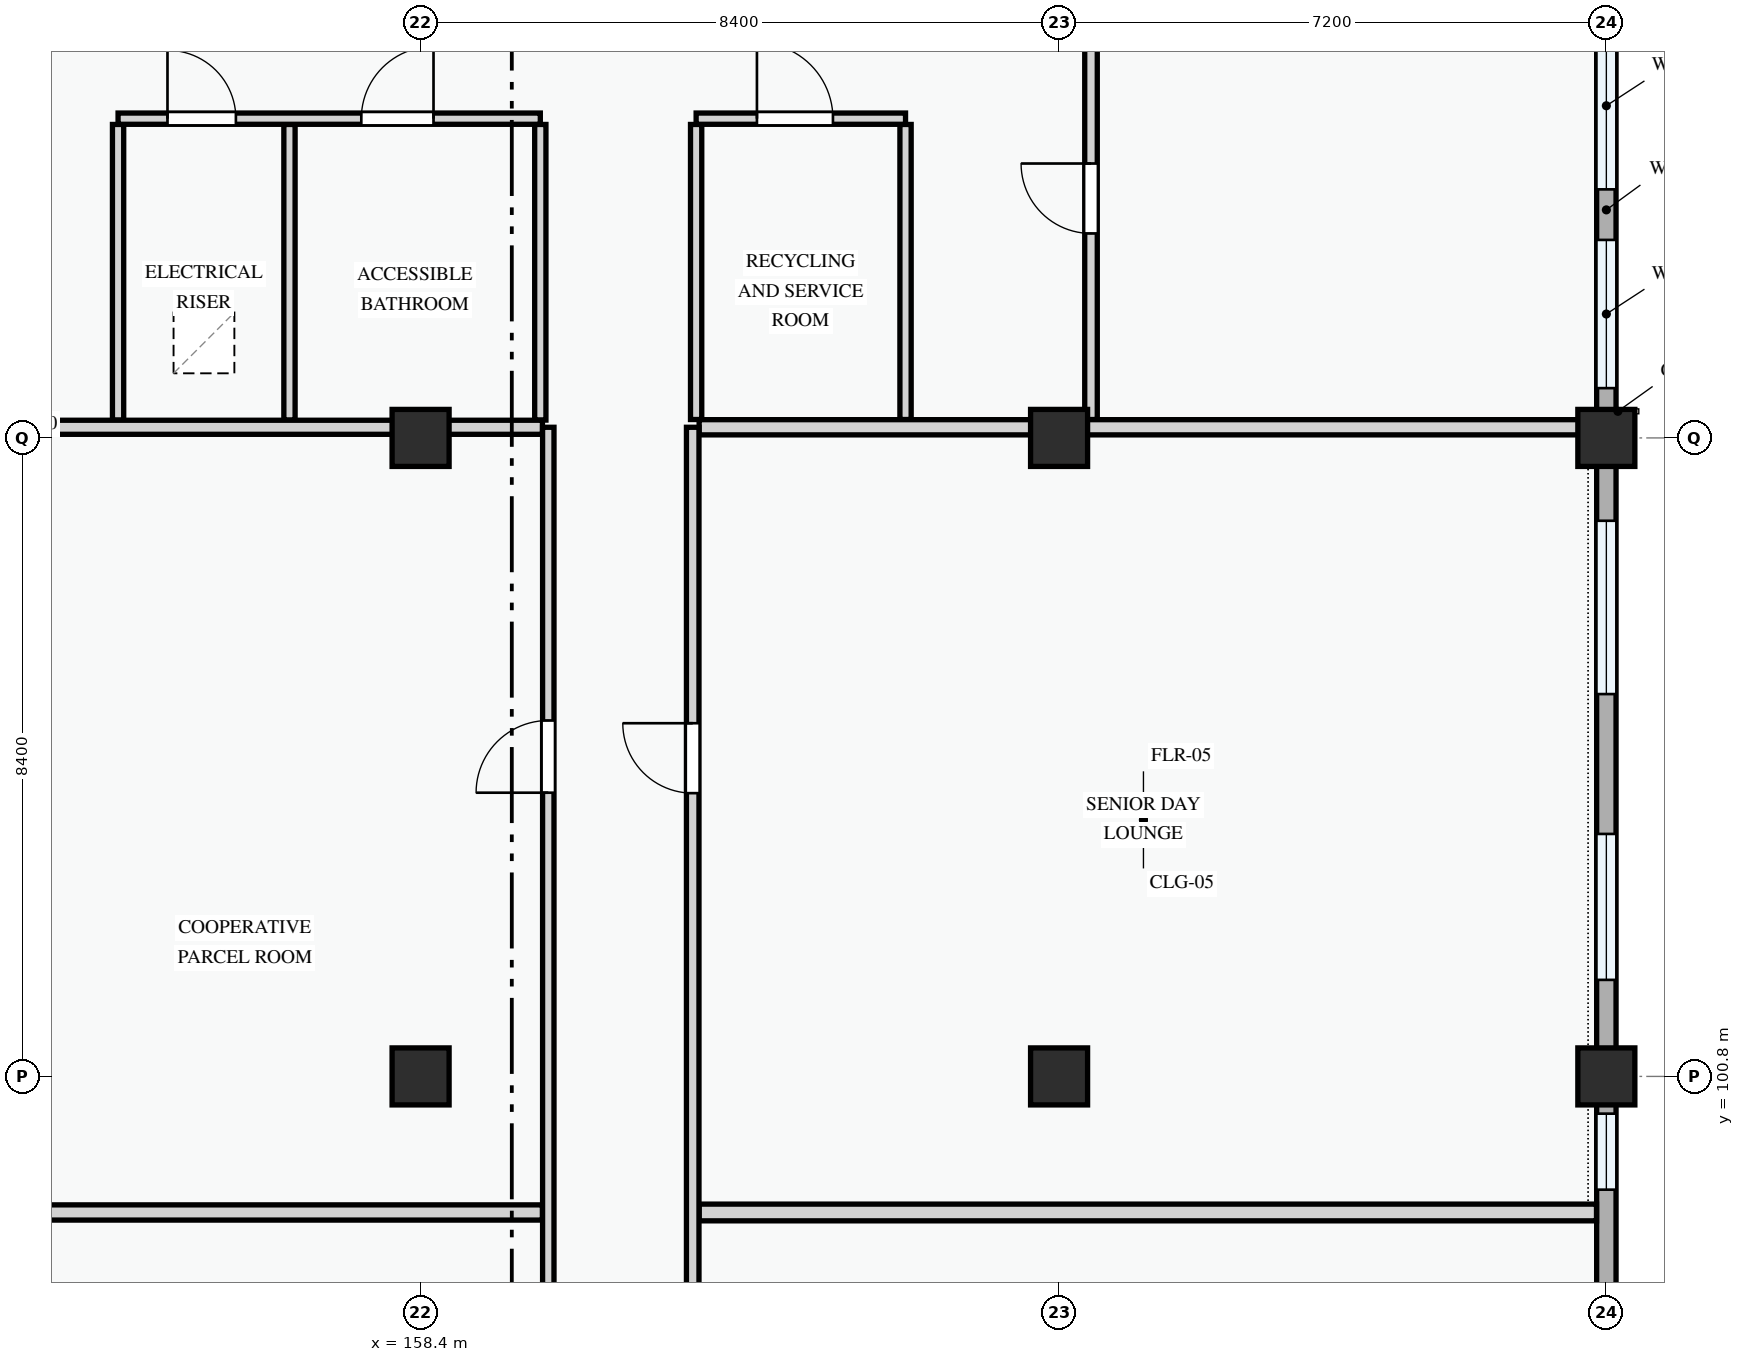
"""IFC4 building model, lengths in metres.
Left out: names, types, materials, properties, quantities, classifications, styles, units other than length and angle.
Written with IfcOpenShell. Run it as: python <this file> out.ifc"""

import sys

from ifc_helpers import new_model, si_unit, direction, frame, frame_2d, origin, origin_2d, place, context, subcontext, project, spatial, rectangle, extrude, element, fill, save


model = new_model("IFC4")
c1 = context("Model", 3, precision=1e-05, world=origin(), true_north=direction((0.0, 1.0)))
c2 = subcontext(c1, "Body", "Model", "MODEL_VIEW")
j1 = project(units=[si_unit("LENGTHUNIT", "METRE"), si_unit("PLANEANGLEUNIT", "RADIAN")], contexts=[c1])
p1 = place(None, origin())
s1 = spatial("IfcSite", under=j1, at=p1, CompositionType="ELEMENT")
p2 = place(p1, origin())
s2 = spatial("IfcBuilding", under=s1, at=p2, CompositionType="ELEMENT")
p3 = place(p2, origin())
s3 = spatial("IfcBuildingStorey", under=s2, at=p3, CompositionType="ELEMENT", Elevation=0.0)
for number, where, z_axis, x_axis in (
    (1, (158.4, 100.8, 0.0), (0.0, 0.0, 1.0), (1.0, 0.0, 0.0)),
    (2, (158.4, 109.2, 0.0), (0.0, 0.0, 1.0), (1.0, 0.0, 0.0)),
    (3, (166.8, 100.8, 0.0), (0.0, 0.0, 1.0), (1.0, 0.0, 0.0)),
    (4, (166.8, 109.2, 0.0), (0.0, 0.0, 1.0), (1.0, 0.0, 0.0)),
    (5, (174.0, 100.8, 0.0), (0.0, 0.0, 1.0), (1.0, 0.0, 0.0)),
    (6, (174.0, 109.2, 0.0), (0.0, 0.0, 1.0), (1.0, 0.0, 0.0)),
):
    element("IfcColumn", number, at=place(p3, frame(where, z_axis=z_axis, x_axis=x_axis)), inside=s3, PredefinedType="COLUMN", context=c2, shape_type="SweptSolid", body=[
        extrude(rectangle(XDim=0.75, YDim=0.75, at=origin_2d()), origin(), (0.0, 0.0, 1.0), 4.5),
    ])
p4 = place(p3, frame((174.0, 109.2, 0.0), z_axis=(0.0, 0.0, 1.0), x_axis=(0.0, 1.0, 0.0)))
e7 = element("IfcWall", 7, at=p4, inside=s3, PredefinedType="STANDARD", context=c2, shape_type="SweptSolid", body=[
    extrude(rectangle(XDim=6.0, YDim=0.255, at=frame_2d((3.0, 0.0))), origin(), (0.0, 0.0, 1.0), 3.585),
])
p5 = place(p4, frame((0.655, 0.0, 0.78)))
e8 = element("IfcOpeningElement", 8, at=p5, cuts=e7, PredefinedType="OPENING", context=c2, shape_type="SweptSolid", body=[
    extrude(rectangle(XDim=1.95, YDim=1.65, at=frame_2d((0.975, 0.825))), frame((0.0, 0.137, 0.0), z_axis=(0.0, -1.0, 0.0), x_axis=(1.0, 0.0, 0.0)), (0.0, 0.0, 1.0), 0.275),
])
p6 = place(p4, frame((3.27, 0.0, 0.78)))
e9 = element("IfcOpeningElement", 9, at=p6, cuts=e7, PredefinedType="OPENING", context=c2, shape_type="SweptSolid", body=[
    extrude(rectangle(XDim=2.2, YDim=1.5, at=frame_2d((1.1, 0.75))), frame((0.0, 0.137, 0.0), z_axis=(0.0, -1.0, 0.0), x_axis=(1.0, 0.0, 0.0)), (0.0, 0.0, 1.0), 0.275),
])
p7 = place(p3, frame((174.0, 94.8, 0.0), z_axis=(0.0, 0.0, 1.0), x_axis=(0.0, 1.0, 0.0)))
e10 = element("IfcWall", 10, at=p7, inside=s3, PredefinedType="STANDARD", context=c2, shape_type="SweptSolid", body=[
    extrude(rectangle(XDim=6.0, YDim=0.255, at=frame_2d((3.0, 0.0))), origin(), (0.0, 0.0, 1.0), 3.585),
])
p8 = place(p7, frame((1.4, 0.0, 0.0)))
e11 = element("IfcOpeningElement", 11, at=p8, cuts=e10, PredefinedType="OPENING", context=c2, shape_type="SweptSolid", body=[
    extrude(rectangle(XDim=1.6, YDim=2.35, at=frame_2d((0.8, 1.175))), frame((0.0, 0.137, 0.0), z_axis=(0.0, -1.0, 0.0), x_axis=(1.0, 0.0, 0.0)), (0.0, 0.0, 1.0), 0.275),
])
p9 = place(p7, frame((4.51, 0.0, 0.78)))
e12 = element("IfcOpeningElement", 12, at=p9, cuts=e10, PredefinedType="OPENING", context=c2, shape_type="SweptSolid", body=[
    extrude(rectangle(XDim=1.0, YDim=1.25, at=frame_2d((0.5, 0.625))), frame((0.0, 0.137, 0.0), z_axis=(0.0, -1.0, 0.0), x_axis=(1.0, 0.0, 0.0)), (0.0, 0.0, 1.0), 0.275),
])
p10 = place(p3, frame((174.0, 100.8, 0.0), z_axis=(0.0, 0.0, 1.0), x_axis=(0.0, 1.0, 0.0)))
e13 = element("IfcWall", 13, at=p10, inside=s3, PredefinedType="STANDARD", context=c2, shape_type="SweptSolid", body=[
    extrude(rectangle(XDim=8.4, YDim=0.255, at=frame_2d((4.2, 0.0))), origin(), (0.0, 0.0, 1.0), 3.485),
])
p11 = place(p10, frame((1.27, 0.0, 0.78)))
e14 = element("IfcOpeningElement", 14, at=p11, cuts=e13, PredefinedType="OPENING", context=c2, shape_type="SweptSolid", body=[
    extrude(rectangle(XDim=1.92, YDim=1.44, at=frame_2d((0.96, 0.72))), frame((0.0, 0.137, 0.0), z_axis=(0.0, -1.0, 0.0), x_axis=(1.0, 0.0, 0.0)), (0.0, 0.0, 1.0), 0.275),
])
p12 = place(p10, frame((5.03, 0.0, 0.78)))
e15 = element("IfcOpeningElement", 15, at=p12, cuts=e13, PredefinedType="OPENING", context=c2, shape_type="SweptSolid", body=[
    extrude(rectangle(XDim=2.28, YDim=1.46, at=frame_2d((1.14, 0.73))), frame((0.0, 0.137, 0.0), z_axis=(0.0, -1.0, 0.0), x_axis=(1.0, 0.0, 0.0)), (0.0, 0.0, 1.0), 0.275),
])
for number, where, z_axis, x_axis in (
    (16, (154.42, 113.324, 0.0), (0.0, 0.0, 1.0), (0.0, -1.0, 0.0)),
    (17, (156.675, 113.324, 0.0), (0.0, 0.0, 1.0), (0.0, -1.0, 0.0)),
    (18, (159.975, 113.324, 0.0), (0.0, 0.0, 1.0), (0.0, -1.0, 0.0)),
):
    element("IfcWall", number, at=place(p3, frame(where, z_axis=z_axis, x_axis=x_axis)), inside=s3, PredefinedType="PARTITIONING", context=c2, shape_type="SweptSolid", body=[
        extrude(rectangle(XDim=3.889, YDim=0.148, at=frame_2d((1.945, 0.0))), origin(), (0.0, 0.0, 1.0), 4.2),
    ])
for number, where, z_axis, x_axis in (
    (19, (162.025, 113.324, 0.0), (0.0, 0.0, 1.0), (0.0, -1.0, 0.0)),
    (20, (164.78, 113.324, 0.0), (0.0, 0.0, 1.0), (0.0, -1.0, 0.0)),
):
    element("IfcWall", number, at=place(p3, frame(where, z_axis=z_axis, x_axis=x_axis)), inside=s3, PredefinedType="PARTITIONING", context=c2, shape_type="SweptSolid", body=[
        extrude(rectangle(XDim=3.882, YDim=0.148, at=frame_2d((1.941, 0.0))), origin(), (0.0, 0.0, 1.0), 4.2),
    ])
p13 = place(p3, frame((154.42, 113.4, 0.0), z_axis=(0.0, 0.0, 1.0), x_axis=(1.0, 0.0, 0.0)))
e21 = element("IfcWall", 21, at=p13, inside=s3, PredefinedType="PARTITIONING", context=c2, shape_type="SweptSolid", body=[
    extrude(rectangle(XDim=5.555, YDim=0.148, at=frame_2d((2.778, 0.0))), origin(), (0.0, 0.0, 1.0), 4.2),
])
p14 = place(p13, frame((0.65, 0.0, 0.0)))
e22 = element("IfcOpeningElement", 22, at=p14, cuts=e21, PredefinedType="OPENING", context=c2, shape_type="SweptSolid", body=[
    extrude(rectangle(XDim=0.9, YDim=2.1, at=frame_2d((0.45, 1.05))), frame((0.0, 0.084, 0.0), z_axis=(0.0, -1.0, 0.0), x_axis=(1.0, 0.0, 0.0)), (0.0, 0.0, 1.0), 0.168),
])
p15 = place(p13, frame((3.2, 0.0, 0.0)))
e23 = element("IfcOpeningElement", 23, at=p15, cuts=e21, PredefinedType="OPENING", context=c2, shape_type="SweptSolid", body=[
    extrude(rectangle(XDim=0.95, YDim=2.1, at=frame_2d((0.475, 1.05))), frame((0.0, 0.084, 0.0), z_axis=(0.0, -1.0, 0.0), x_axis=(1.0, 0.0, 0.0)), (0.0, 0.0, 1.0), 0.168),
])
p16 = place(p3, frame((162.025, 113.4, 0.0), z_axis=(0.0, 0.0, 1.0), x_axis=(1.0, 0.0, 0.0)))
e24 = element("IfcWall", 24, at=p16, inside=s3, PredefinedType="PARTITIONING", context=c2, shape_type="SweptSolid", body=[
    extrude(rectangle(XDim=2.755, YDim=0.148, at=frame_2d((1.377, 0.0))), origin(), (0.0, 0.0, 1.0), 4.2),
])
p17 = place(p16, frame((0.8, 0.0, 0.0)))
e25 = element("IfcOpeningElement", 25, at=p17, cuts=e24, PredefinedType="OPENING", context=c2, shape_type="SweptSolid", body=[
    extrude(rectangle(XDim=1.0, YDim=2.15, at=frame_2d((0.5, 1.075))), frame((0.0, 0.084, 0.0), z_axis=(0.0, -1.0, 0.0), x_axis=(1.0, 0.0, 0.0)), (0.0, 0.0, 1.0), 0.168),
])
p18 = place(p3, frame((167.22, 109.442, 0.0), z_axis=(0.0, 0.0, 1.0), x_axis=(0.0, 1.0, 0.0)))
e26 = element("IfcWall", 26, at=p18, inside=s3, PredefinedType="PARTITIONING", context=c2, shape_type="SweptSolid", body=[
    extrude(rectangle(XDim=14.018, YDim=0.165, at=frame_2d((7.009, 0.0))), origin(), (0.0, 0.0, 1.0), 3.485),
])
p19 = place(p18, frame((2.448, 0.0, 0.0)))
e27 = element("IfcOpeningElement", 27, at=p19, cuts=e26, PredefinedType="OPENING", context=c2, shape_type="SweptSolid", body=[
    extrude(rectangle(XDim=0.92, YDim=2.1, at=frame_2d((0.46, 1.05))), frame((0.0, 0.093, 0.0), z_axis=(0.0, -1.0, 0.0), x_axis=(1.0, 0.0, 0.0)), (0.0, 0.0, 1.0), 0.185),
])
p20 = place(p3, frame((152.53, 99.01, 0.0), z_axis=(0.0, 0.0, 1.0), x_axis=(1.0, 0.0, 0.0)))
e28 = element("IfcWall", 28, at=p20, inside=s3, PredefinedType="PARTITIONING", context=c2, shape_type="SweptSolid", body=[
    extrude(rectangle(XDim=7.473, YDim=0.2, at=frame_2d((3.737, 0.0))), origin(), (0.0, 0.0, 1.0), 4.2),
])
p21 = place(p3, frame((162.064, 99.01, 0.0), z_axis=(0.0, 0.0, 1.0), x_axis=(1.0, 0.0, 0.0)))
e29 = element("IfcWall", 29, at=p21, inside=s3, PredefinedType="PARTITIONING", context=c2, shape_type="SweptSolid", body=[
    extrude(rectangle(XDim=11.806, YDim=0.22, at=frame_2d((5.903, 0.0))), origin(), (0.0, 0.0, 1.0), 4.2),
])
p22 = place(p3, frame((152.46, 109.34, 0.0), z_axis=(0.0, 0.0, 1.0), x_axis=(1.0, 0.0, 0.0)))
e30 = element("IfcWall", 30, at=p22, inside=s3, PredefinedType="PARTITIONING", context=c2, shape_type="SweptSolid", body=[
    extrude(rectangle(XDim=7.543, YDim=0.185, at=frame_2d((3.771, 0.0))), origin(), (0.0, 0.0, 1.0), 3.485),
])
p23 = place(p3, frame((162.064, 109.34, 0.0), z_axis=(0.0, 0.0, 1.0), x_axis=(1.0, 0.0, 0.0)))
e31 = element("IfcWall", 31, at=p23, inside=s3, PredefinedType="PARTITIONING", context=c2, shape_type="SweptSolid", body=[
    extrude(rectangle(XDim=11.806, YDim=0.2, at=frame_2d((5.903, 0.0))), origin(), (0.0, 0.0, 1.0), 3.485),
])
p24 = place(p3, frame((160.08, 80.53, 0.0), z_axis=(0.0, 0.0, 1.0), x_axis=(0.0, 1.0, 0.0)))
e32 = element("IfcWall", 32, at=p24, inside=s3, PredefinedType="PARTITIONING", context=c2, shape_type="SweptSolid", body=[
    extrude(rectangle(XDim=28.811, YDim=0.15, at=frame_2d((14.405, 0.0))), origin(), (0.0, 0.0, 1.0), 4.2),
])
p25 = place(p24, frame((2.453, 0.0, 0.0)))
e33 = element("IfcOpeningElement", 33, at=p25, cuts=e32, PredefinedType="OPENING", context=c2, shape_type="SweptSolid", body=[
    extrude(rectangle(XDim=0.95, YDim=2.1, at=frame_2d((0.475, 1.05))), frame((0.0, 0.085, 0.0), z_axis=(0.0, -1.0, 0.0), x_axis=(1.0, 0.0, 0.0)), (0.0, 0.0, 1.0), 0.17),
])
p26 = place(p24, frame((9.71, 0.0, 0.0)))
e34 = element("IfcOpeningElement", 34, at=p26, cuts=e32, PredefinedType="OPENING", context=c2, shape_type="SweptSolid", body=[
    extrude(rectangle(XDim=0.95, YDim=2.1, at=frame_2d((0.475, 1.05))), frame((0.0, 0.085, 0.0), z_axis=(0.0, -1.0, 0.0), x_axis=(1.0, 0.0, 0.0)), (0.0, 0.0, 1.0), 0.17),
])
p27 = place(p24, frame((24.003, 0.0, 0.0)))
e35 = element("IfcOpeningElement", 35, at=p27, cuts=e32, PredefinedType="OPENING", context=c2, shape_type="SweptSolid", body=[
    extrude(rectangle(XDim=0.95, YDim=2.1, at=frame_2d((0.475, 1.05))), frame((0.0, 0.085, 0.0), z_axis=(0.0, -1.0, 0.0), x_axis=(1.0, 0.0, 0.0)), (0.0, 0.0, 1.0), 0.17),
])
p28 = place(p3, frame((161.98, 80.53, 0.0), z_axis=(0.0, 0.0, 1.0), x_axis=(0.0, 1.0, 0.0)))
e36 = element("IfcWall", 36, at=p28, inside=s3, PredefinedType="PARTITIONING", context=c2, shape_type="SweptSolid", body=[
    extrude(rectangle(XDim=28.811, YDim=0.165, at=frame_2d((14.405, 0.0))), origin(), (0.0, 0.0, 1.0), 4.2),
])
p29 = place(p28, frame((2.45, 0.0, 0.0)))
e37 = element("IfcOpeningElement", 37, at=p29, cuts=e36, PredefinedType="OPENING", context=c2, shape_type="SweptSolid", body=[
    extrude(rectangle(XDim=0.92, YDim=2.1, at=frame_2d((0.46, 1.05))), frame((0.0, 0.093, 0.0), z_axis=(0.0, -1.0, 0.0), x_axis=(1.0, 0.0, 0.0)), (0.0, 0.0, 1.0), 0.185),
])
p30 = place(p28, frame((9.71, 0.0, 0.0)))
e38 = element("IfcOpeningElement", 38, at=p30, cuts=e36, PredefinedType="OPENING", context=c2, shape_type="SweptSolid", body=[
    extrude(rectangle(XDim=0.92, YDim=2.1, at=frame_2d((0.46, 1.05))), frame((0.0, 0.093, 0.0), z_axis=(0.0, -1.0, 0.0), x_axis=(1.0, 0.0, 0.0)), (0.0, 0.0, 1.0), 0.185),
])
p31 = place(p28, frame((23.997, 0.0, 0.0)))
e39 = element("IfcOpeningElement", 39, at=p31, cuts=e36, PredefinedType="OPENING", context=c2, shape_type="SweptSolid", body=[
    extrude(rectangle(XDim=0.92, YDim=2.1, at=frame_2d((0.46, 1.05))), frame((0.0, 0.093, 0.0), z_axis=(0.0, -1.0, 0.0), x_axis=(1.0, 0.0, 0.0)), (0.0, 0.0, 1.0), 0.185),
])
p32 = place(p5, origin())
e40 = element("IfcWindow", 40, at=p32, inside=s3, PartitioningType="DOUBLE_PANEL_VERTICAL", PredefinedType="WINDOW", context=c2, shape_type="SweptSolid", body=[
    extrude(rectangle(XDim=1.95, YDim=1.65, at=frame_2d((0.975, 0.825))), frame((0.0, 0.03, 0.0), z_axis=(0.0, -1.0, 0.0), x_axis=(1.0, 0.0, 0.0)), (0.0, 0.0, 1.0), 0.06),
])
fill(e8, e40)
p33 = place(p6, origin())
e41 = element("IfcWindow", 41, at=p33, inside=s3, PartitioningType="DOUBLE_PANEL_VERTICAL", PredefinedType="WINDOW", context=c2, shape_type="SweptSolid", body=[
    extrude(rectangle(XDim=2.2, YDim=1.5, at=frame_2d((1.1, 0.75))), frame((0.0, 0.03, 0.0), z_axis=(0.0, -1.0, 0.0), x_axis=(1.0, 0.0, 0.0)), (0.0, 0.0, 1.0), 0.06),
])
fill(e9, e41)
p34 = place(p9, origin())
e42 = element("IfcWindow", 42, at=p34, inside=s3, PartitioningType="SINGLE_PANEL", PredefinedType="WINDOW", context=c2, shape_type="SweptSolid", body=[
    extrude(rectangle(XDim=1.0, YDim=1.25, at=frame_2d((0.5, 0.625))), frame((0.0, 0.03, 0.0), z_axis=(0.0, -1.0, 0.0), x_axis=(1.0, 0.0, 0.0)), (0.0, 0.0, 1.0), 0.06),
])
fill(e12, e42)
p35 = place(p11, origin())
e43 = element("IfcWindow", 43, at=p35, inside=s3, PartitioningType="DOUBLE_PANEL_VERTICAL", PredefinedType="WINDOW", context=c2, shape_type="SweptSolid", body=[
    extrude(rectangle(XDim=1.92, YDim=1.44, at=frame_2d((0.96, 0.72))), frame((0.0, 0.03, 0.0), z_axis=(0.0, -1.0, 0.0), x_axis=(1.0, 0.0, 0.0)), (0.0, 0.0, 1.0), 0.06),
])
fill(e14, e43)
p36 = place(p12, origin())
e44 = element("IfcWindow", 44, at=p36, inside=s3, PartitioningType="DOUBLE_PANEL_VERTICAL", PredefinedType="WINDOW", context=c2, shape_type="SweptSolid", body=[
    extrude(rectangle(XDim=2.28, YDim=1.46, at=frame_2d((1.14, 0.73))), frame((0.0, 0.03, 0.0), z_axis=(0.0, -1.0, 0.0), x_axis=(1.0, 0.0, 0.0)), (0.0, 0.0, 1.0), 0.06),
])
fill(e15, e44)
p37 = place(p14, origin())
e45 = element("IfcDoor", 45, at=p37, inside=s3, OperationType="SINGLE_SWING_LEFT", PredefinedType="DOOR", context=c2, shape_type="SweptSolid", body=[
    extrude(rectangle(XDim=0.9, YDim=2.1, at=frame_2d((0.45, 1.05))), frame((0.0, 0.025, 0.0), z_axis=(0.0, -1.0, 0.0), x_axis=(1.0, 0.0, 0.0)), (0.0, 0.0, 1.0), 0.05),
])
fill(e22, e45)
p38 = place(p15, origin())
e46 = element("IfcDoor", 46, at=p38, inside=s3, OperationType="SINGLE_SWING_RIGHT", PredefinedType="DOOR", context=c2, shape_type="SweptSolid", body=[
    extrude(rectangle(XDim=0.95, YDim=2.1, at=frame_2d((0.475, 1.05))), frame((0.0, 0.025, 0.0), z_axis=(0.0, -1.0, 0.0), x_axis=(1.0, 0.0, 0.0)), (0.0, 0.0, 1.0), 0.05),
])
fill(e23, e46)
p39 = place(p17, origin())
e47 = element("IfcDoor", 47, at=p39, inside=s3, OperationType="SINGLE_SWING_LEFT", PredefinedType="DOOR", context=c2, shape_type="SweptSolid", body=[
    extrude(rectangle(XDim=1.0, YDim=2.15, at=frame_2d((0.5, 1.075))), frame((0.0, 0.025, 0.0), z_axis=(0.0, -1.0, 0.0), x_axis=(1.0, 0.0, 0.0)), (0.0, 0.0, 1.0), 0.05),
])
fill(e25, e47)
p40 = place(p19, origin())
e48 = element("IfcDoor", 48, at=p40, inside=s3, OperationType="SINGLE_SWING_RIGHT", PredefinedType="DOOR", context=c2, shape_type="SweptSolid", body=[
    extrude(rectangle(XDim=0.92, YDim=2.1, at=frame_2d((0.46, 1.05))), frame((0.0, 0.025, 0.0), z_axis=(0.0, -1.0, 0.0), x_axis=(1.0, 0.0, 0.0)), (0.0, 0.0, 1.0), 0.05),
])
fill(e27, e48)
p41 = place(p27, origin())
e49 = element("IfcDoor", 49, at=p41, inside=s3, OperationType="SINGLE_SWING_LEFT", PredefinedType="DOOR", context=c2, shape_type="SweptSolid", body=[
    extrude(rectangle(XDim=0.95, YDim=2.1, at=frame_2d((0.475, 1.05))), frame((0.0, 0.025, 0.0), z_axis=(0.0, -1.0, 0.0), x_axis=(1.0, 0.0, 0.0)), (0.0, 0.0, 1.0), 0.05),
])
fill(e35, e49)
p42 = place(p31, origin())
e50 = element("IfcDoor", 50, at=p42, inside=s3, OperationType="SINGLE_SWING_RIGHT", PredefinedType="DOOR", context=c2, shape_type="SweptSolid", body=[
    extrude(rectangle(XDim=0.92, YDim=2.1, at=frame_2d((0.46, 1.05))), frame((0.0, 0.025, 0.0), z_axis=(0.0, -1.0, 0.0), x_axis=(1.0, 0.0, 0.0)), (0.0, 0.0, 1.0), 0.05),
])
fill(e39, e50)
save(model, sys.argv[1])
